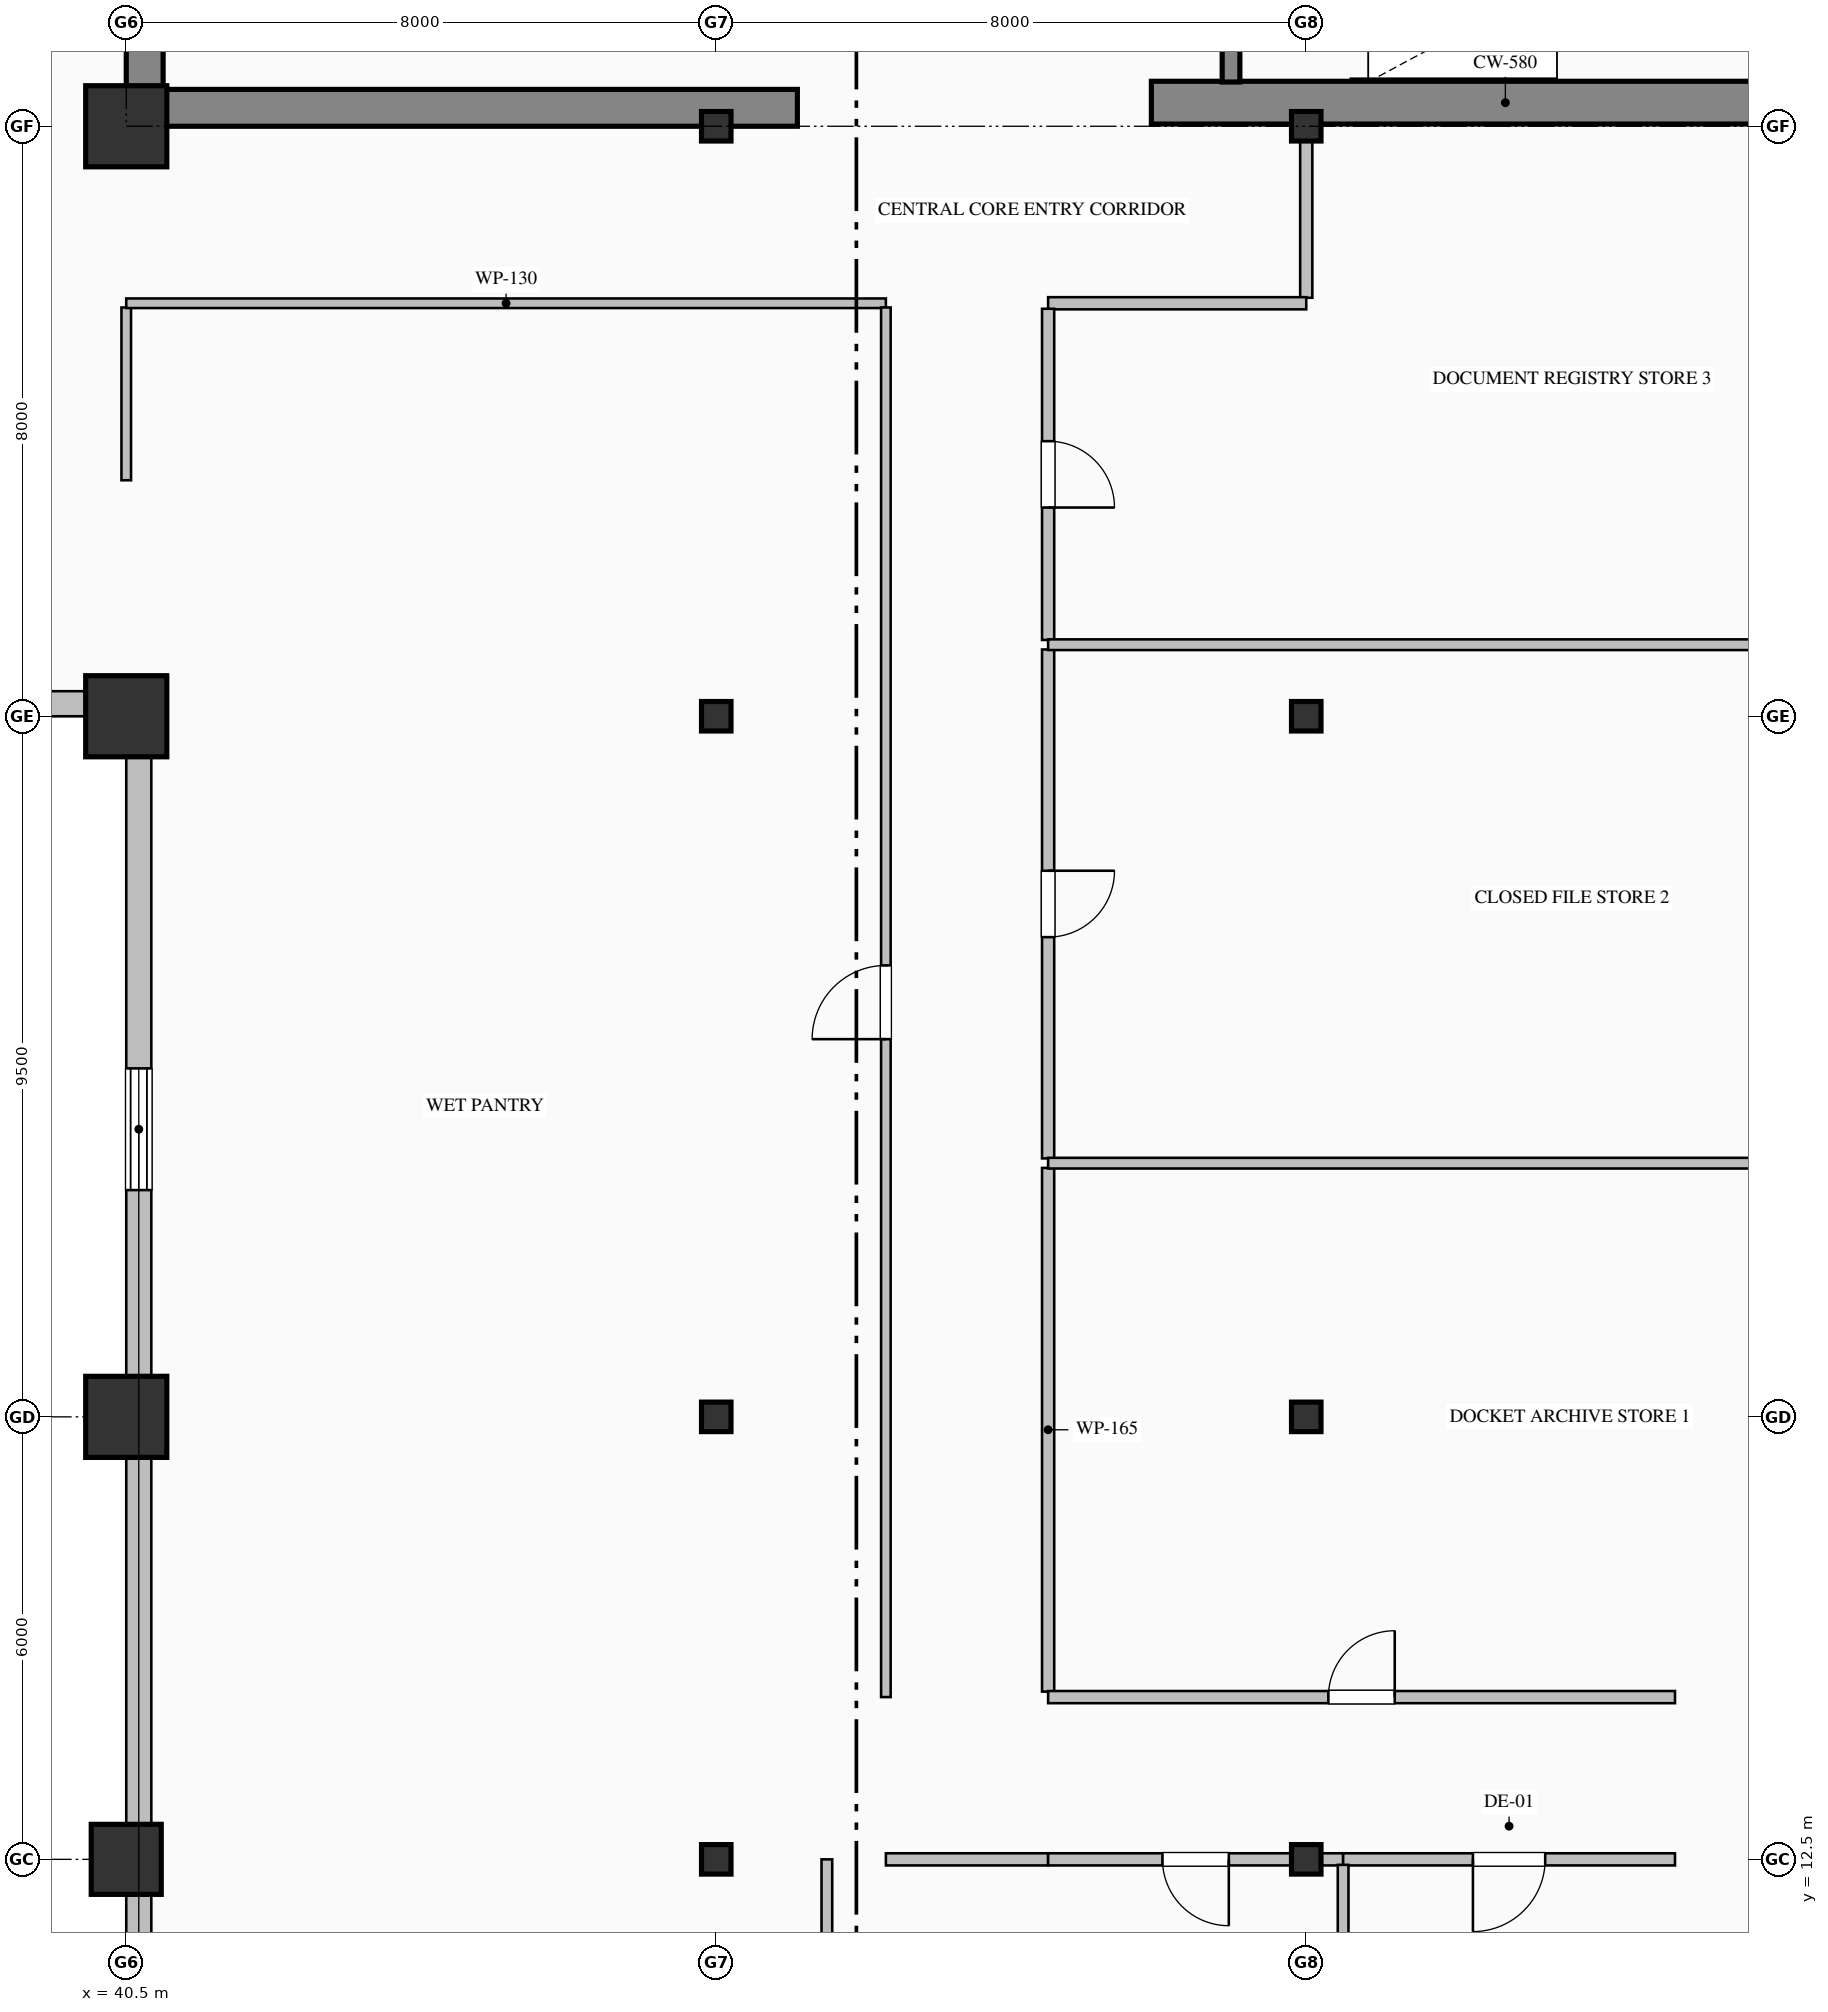
"""IFC4 building model, lengths in metres.
Left out: names, types, materials, properties, quantities, classifications, styles, units other than length and angle.
Written with IfcOpenShell. Run it as: python <this file> out.ifc"""

import sys

from ifc_helpers import new_model, si_unit, direction, frame, frame_2d, origin, origin_2d, place, context, subcontext, project, spatial, rectangle, hollow_rectangle, i_section, extrude, element, fill, save


model = new_model("IFC4")
c1 = context("Model", 3, precision=1e-05, world=origin(), true_north=direction((0.0, 1.0)))
c2 = subcontext(c1, "Body", "Model", "MODEL_VIEW")
j1 = project(units=[si_unit("LENGTHUNIT", "METRE"), si_unit("PLANEANGLEUNIT", "RADIAN")], contexts=[c1])
p1 = place(None, origin())
s1 = spatial("IfcSite", under=j1, at=p1, CompositionType="ELEMENT")
p2 = place(p1, origin())
s2 = spatial("IfcBuilding", under=s1, at=p2, CompositionType="ELEMENT")
p3 = place(p2, frame((0.0, 0.0, 191.0)))
s3 = spatial("IfcBuildingStorey", under=s2, at=p3, CompositionType="ELEMENT", Elevation=191.0)
p4 = place(p3, frame((40.75, 36.5, 0.0), z_axis=(0.0, 0.0, 1.0), x_axis=(0.0, 1.0, 0.0)))
e1 = element("IfcWall", 1, at=p4, inside=s3, PredefinedType="SHEAR", context=c2, shape_type="SweptSolid", body=[
    extrude(rectangle(XDim=7.9, YDim=0.5, at=frame_2d((3.95, 0.0))), origin(), (0.0, 0.0, 1.0), 3.65),
])
p5 = place(p3, frame((40.5, 36.25, 0.0), z_axis=(0.0, 0.0, 1.0), x_axis=(1.0, 0.0, 0.0)))
e2 = element("IfcWall", 2, at=p5, inside=s3, PredefinedType="SHEAR", context=c2, shape_type="SweptSolid", body=[
    extrude(rectangle(XDim=9.1, YDim=0.5, at=frame_2d((4.55, 0.0))), origin(), (0.0, 0.0, 1.0), 3.65),
])
p6 = place(p3, frame((54.4, 36.32, 0.0), z_axis=(0.0, 0.0, 1.0), x_axis=(1.0, 0.0, 0.0)))
e3 = element("IfcWall", 3, at=p6, inside=s3, PredefinedType="SHEAR", context=c2, shape_type="SweptSolid", body=[
    extrude(rectangle(XDim=9.6, YDim=0.58, at=frame_2d((4.8, 0.0))), origin(), (0.0, 0.0, 1.0), 4.0),
])
p7 = place(p3, frame((40.5, 12.5, 0.0), z_axis=(0.0, 0.0, 1.0), x_axis=(1.0, 0.0, 0.0)))
e4 = element("IfcColumn", 4, at=p7, inside=s3, PredefinedType="COLUMN", context=c2, shape_type="SweptSolid", body=[
    extrude(hollow_rectangle(XDim=0.95, YDim=0.95, WallThickness=0.036, at=origin_2d()), origin(), (0.0, 0.0, 1.0), 4.0),
])
for number, where, z_axis, x_axis in (
    (5, (40.5, 18.5, 0.0), (0.0, 0.0, 1.0), (1.0, 0.0, 0.0)),
    (6, (40.5, 28.0, 0.0), (0.0, 0.0, 1.0), (1.0, 0.0, 0.0)),
    (7, (40.5, 36.0, 0.0), (0.0, 0.0, 1.0), (1.0, 0.0, 0.0)),
):
    element("IfcColumn", number, at=place(p3, frame(where, z_axis=z_axis, x_axis=x_axis)), inside=s3, PredefinedType="COLUMN", context=c2, shape_type="SweptSolid", body=[
        extrude(hollow_rectangle(XDim=1.1, YDim=1.1, WallThickness=0.04, at=origin_2d()), origin(), (0.0, 0.0, 1.0), 4.0),
    ])
for number, where, z_axis, x_axis in (
    (8, (48.5, 12.5, 0.0), (0.0, 0.0, 1.0), (1.0, 0.0, 0.0)),
    (9, (48.5, 18.5, 0.0), (0.0, 0.0, 1.0), (1.0, 0.0, 0.0)),
    (10, (48.5, 28.0, 0.0), (0.0, 0.0, 1.0), (1.0, 0.0, 0.0)),
    (11, (48.5, 36.0, 0.0), (0.0, 0.0, 1.0), (1.0, 0.0, 0.0)),
    (12, (56.5, 12.5, 0.0), (0.0, 0.0, 1.0), (1.0, 0.0, 0.0)),
    (13, (56.5, 18.5, 0.0), (0.0, 0.0, 1.0), (1.0, 0.0, 0.0)),
    (14, (56.5, 28.0, 0.0), (0.0, 0.0, 1.0), (1.0, 0.0, 0.0)),
    (15, (56.5, 36.0, 0.0), (0.0, 0.0, 1.0), (1.0, 0.0, 0.0)),
):
    element("IfcColumn", number, at=place(p3, frame(where, z_axis=z_axis, x_axis=x_axis)), inside=s3, PredefinedType="COLUMN", context=c2, shape_type="SweptSolid", body=[
        extrude(i_section(OverallWidth=0.4, OverallDepth=0.4, WebThickness=0.013, FlangeThickness=0.021, FilletRadius=0.022, at=origin_2d()), origin(), (0.0, 0.0, 1.0), 4.0),
    ])
p8 = place(p3, frame((40.67, 8.0, 0.0), z_axis=(0.0, 0.0, 1.0), x_axis=(0.0, 1.0, 0.0)))
e16 = element("IfcWall", 16, at=p8, inside=s3, PredefinedType="SOLIDWALL", context=c2, shape_type="SweptSolid", body=[
    extrude(rectangle(XDim=20.34, YDim=0.34, at=frame_2d((10.17, 0.0))), origin(), (0.0, 0.0, 1.0), 3.05),
])
p9 = place(p8, frame((13.575, 0.0, 0.85)))
e17 = element("IfcOpeningElement", 17, at=p9, cuts=e16, PredefinedType="OPENING", context=c2, shape_type="SweptSolid", body=[
    extrude(rectangle(XDim=1.65, YDim=1.95, at=frame_2d((0.825, 0.975))), frame((0.0, 0.18, 0.0), z_axis=(0.0, -1.0, 0.0), x_axis=(1.0, 0.0, 0.0)), (0.0, 0.0, 1.0), 0.36),
])
p10 = place(p3, frame((40.52, 28.17, 0.0), z_axis=(0.0, 0.0, 1.0), x_axis=(-1.0, 0.0, 0.0)))
e18 = element("IfcWall", 18, at=p10, inside=s3, PredefinedType="SOLIDWALL", context=c2, shape_type="SweptSolid", body=[
    extrude(rectangle(XDim=27.52, YDim=0.34, at=frame_2d((13.76, 0.0))), origin(), (0.0, 0.0, 1.0), 3.05),
])
p11 = place(p10, frame((9.975, 0.0, 0.85)))
e19 = element("IfcOpeningElement", 19, at=p11, cuts=e18, PredefinedType="OPENING", context=c2, shape_type="SweptSolid", body=[
    extrude(rectangle(XDim=1.65, YDim=1.95, at=frame_2d((0.825, 0.975))), frame((0.0, 0.18, 0.0), z_axis=(0.0, -1.0, 0.0), x_axis=(1.0, 0.0, 0.0)), (0.0, 0.0, 1.0), 0.36),
])
p12 = place(p10, frame((17.25, 0.0, 0.85)))
e20 = element("IfcOpeningElement", 20, at=p12, cuts=e18, PredefinedType="OPENING", context=c2, shape_type="SweptSolid", body=[
    extrude(rectangle(XDim=1.5, YDim=1.95, at=frame_2d((0.75, 0.975))), frame((0.0, 0.18, 0.0), z_axis=(0.0, -1.0, 0.0), x_axis=(1.0, 0.0, 0.0)), (0.0, 0.0, 1.0), 0.36),
])
p13 = place(p10, frame((20.775, 0.0, 0.85)))
e21 = element("IfcOpeningElement", 21, at=p13, cuts=e18, PredefinedType="OPENING", context=c2, shape_type="SweptSolid", body=[
    extrude(rectangle(XDim=1.65, YDim=1.95, at=frame_2d((0.825, 0.975))), frame((0.0, 0.18, 0.0), z_axis=(0.0, -1.0, 0.0), x_axis=(1.0, 0.0, 0.0)), (0.0, 0.0, 1.0), 0.36),
])
p14 = place(p3, frame((55.48, 39.75, 0.0), z_axis=(0.0, 0.0, 1.0), x_axis=(0.0, -1.0, 0.0)))
e22 = element("IfcWall", 22, at=p14, inside=s3, PredefinedType="SOLIDWALL", context=c2, shape_type="SweptSolid", body=[
    extrude(rectangle(XDim=3.15, YDim=0.24, at=frame_2d((1.575, 0.0))), origin(), (0.0, 0.0, 1.0), 4.0),
])
p15 = place(p14, frame((1.0, 0.0, 0.0)))
e23 = element("IfcOpeningElement", 23, at=p15, cuts=e22, PredefinedType="OPENING", context=c2, shape_type="SweptSolid", body=[
    extrude(rectangle(XDim=1.15, YDim=2.2, at=frame_2d((0.575, 1.1))), frame((0.0, 0.13, 0.0), z_axis=(0.0, -1.0, 0.0), x_axis=(1.0, 0.0, 0.0)), (0.0, 0.0, 1.0), 0.26),
])
p16 = place(p3, frame((40.5, 33.543, 0.0), z_axis=(0.0, 0.0, 1.0), x_axis=(0.0, -1.0, 0.0)))
e24 = element("IfcWall", 24, at=p16, inside=s3, PredefinedType="PARTITIONING", context=c2, shape_type="SweptSolid", body=[
    extrude(rectangle(XDim=2.343, YDim=0.13, at=frame_2d((1.171, 0.0))), origin(), (0.0, 0.0, 1.0), 3.042),
])
p17 = place(p3, frame((56.5, 36.0, 0.0), z_axis=(0.0, 0.0, 1.0), x_axis=(0.0, -1.0, 0.0)))
e25 = element("IfcWall", 25, at=p17, inside=s3, PredefinedType="PARTITIONING", context=c2, shape_type="SweptSolid", body=[
    extrude(rectangle(XDim=2.325, YDim=0.165, at=frame_2d((1.163, 0.0))), origin(), (0.0, 0.0, 1.0), 3.042),
])
p18 = place(p3, frame((56.5, 33.6, 0.0), z_axis=(0.0, 0.0, 1.0), x_axis=(-1.0, 0.0, 0.0)))
e26 = element("IfcWall", 26, at=p18, inside=s3, PredefinedType="PARTITIONING", context=c2, shape_type="SweptSolid", body=[
    extrude(rectangle(XDim=3.5, YDim=0.165, at=frame_2d((1.75, 0.0))), origin(), (0.0, 0.0, 1.0), 3.65),
])
p19 = place(p3, frame((50.8, 33.6, 0.0), z_axis=(0.0, 0.0, 1.0), x_axis=(-1.0, 0.0, 0.0)))
e27 = element("IfcWall", 27, at=p19, inside=s3, PredefinedType="PARTITIONING", context=c2, shape_type="SweptSolid", body=[
    extrude(rectangle(XDim=10.3, YDim=0.13, at=frame_2d((5.15, 0.0))), origin(), (0.0, 0.0, 1.0), 3.65),
])
p20 = place(p3, frame((53.0, 21.875, 0.0), z_axis=(0.0, 0.0, 1.0), x_axis=(0.0, -1.0, 0.0)))
e28 = element("IfcWall", 28, at=p20, inside=s3, PredefinedType="PARTITIONING", context=c2, shape_type="SweptSolid", body=[
    extrude(rectangle(XDim=7.101, YDim=0.165, at=frame_2d((3.551, 0.0))), origin(), (0.0, 0.0, 1.0), 3.65),
])
p21 = place(p3, frame((53.0, 28.906, 0.0), z_axis=(0.0, 0.0, 1.0), x_axis=(0.0, -1.0, 0.0)))
e29 = element("IfcWall", 29, at=p21, inside=s3, PredefinedType="PARTITIONING", context=c2, shape_type="SweptSolid", body=[
    extrude(rectangle(XDim=6.901, YDim=0.165, at=frame_2d((3.451, 0.0))), origin(), (0.0, 0.0, 1.0), 3.65),
])
p22 = place(p21, frame((3.0, 0.0, 0.0)))
e30 = element("IfcOpeningElement", 30, at=p22, cuts=e29, PredefinedType="OPENING", context=c2, shape_type="SweptSolid", body=[
    extrude(rectangle(XDim=0.9, YDim=2.15, at=frame_2d((0.45, 1.075))), frame((0.0, 0.093, 0.0), z_axis=(0.0, -1.0, 0.0), x_axis=(1.0, 0.0, 0.0)), (0.0, 0.0, 1.0), 0.185),
])
p23 = place(p3, frame((53.0, 33.525, 0.0), z_axis=(0.0, 0.0, 1.0), x_axis=(0.0, -1.0, 0.0)))
e31 = element("IfcWall", 31, at=p23, inside=s3, PredefinedType="PARTITIONING", context=c2, shape_type="SweptSolid", body=[
    extrude(rectangle(XDim=4.491, YDim=0.165, at=frame_2d((2.246, 0.0))), origin(), (0.0, 0.0, 1.0), 3.65),
])
p24 = place(p23, frame((1.795, 0.0, 0.0)))
e32 = element("IfcOpeningElement", 32, at=p24, cuts=e31, PredefinedType="OPENING", context=c2, shape_type="SweptSolid", body=[
    extrude(rectangle(XDim=0.9, YDim=2.15, at=frame_2d((0.45, 1.075))), frame((0.0, 0.093, 0.0), z_axis=(0.0, -1.0, 0.0), x_axis=(1.0, 0.0, 0.0)), (0.0, 0.0, 1.0), 0.185),
])
p25 = place(p3, frame((50.8, 14.7, 0.0), z_axis=(0.0, 0.0, 1.0), x_axis=(0.0, 1.0, 0.0)))
e33 = element("IfcWall", 33, at=p25, inside=s3, PredefinedType="PARTITIONING", context=c2, shape_type="SweptSolid", body=[
    extrude(rectangle(XDim=18.843, YDim=0.13, at=frame_2d((9.421, 0.0))), origin(), (0.0, 0.0, 1.0), 3.65),
])
p26 = place(p25, frame((8.921, 0.0, 0.0)))
e34 = element("IfcOpeningElement", 34, at=p26, cuts=e33, PredefinedType="OPENING", context=c2, shape_type="SweptSolid", body=[
    extrude(rectangle(XDim=1.0, YDim=2.15, at=frame_2d((0.5, 1.075))), frame((0.0, 0.075, 0.0), z_axis=(0.0, -1.0, 0.0), x_axis=(1.0, 0.0, 0.0)), (0.0, 0.0, 1.0), 0.15),
])
p27 = place(p3, frame((53.0, 12.5, 0.0), z_axis=(0.0, 0.0, 1.0), x_axis=(-1.0, 0.0, 0.0)))
e35 = element("IfcWall", 35, at=p27, inside=s3, PredefinedType="PARTITIONING", context=c2, shape_type="SweptSolid", body=[
    extrude(rectangle(XDim=2.2, YDim=0.165, at=frame_2d((1.1, 0.0))), origin(), (0.0, 0.0, 1.0), 3.042),
])
p28 = place(p3, frame((53.0, 14.7, 0.0), z_axis=(0.0, 0.0, 1.0), x_axis=(1.0, 0.0, 0.0)))
e36 = element("IfcWall", 36, at=p28, inside=s3, PredefinedType="PARTITIONING", context=c2, shape_type="SweptSolid", body=[
    extrude(rectangle(XDim=8.5, YDim=0.165, at=frame_2d((4.25, 0.0))), origin(), (0.0, 0.0, 1.0), 3.65),
])
p29 = place(p28, frame((3.8, 0.0, 0.0)))
e37 = element("IfcOpeningElement", 37, at=p29, cuts=e36, PredefinedType="OPENING", context=c2, shape_type="SweptSolid", body=[
    extrude(rectangle(XDim=0.9, YDim=2.15, at=frame_2d((0.45, 1.075))), frame((0.0, 0.093, 0.0), z_axis=(0.0, -1.0, 0.0), x_axis=(1.0, 0.0, 0.0)), (0.0, 0.0, 1.0), 0.185),
])
p30 = place(p3, frame((57.0, 12.5, 0.0), z_axis=(0.0, 0.0, 1.0), x_axis=(-1.0, 0.0, 0.0)))
e38 = element("IfcWall", 38, at=p30, inside=s3, PredefinedType="PARTITIONING", context=c2, shape_type="SweptSolid", body=[
    extrude(rectangle(XDim=4.0, YDim=0.165, at=frame_2d((2.0, 0.0))), origin(), (0.0, 0.0, 1.0), 3.042),
])
p31 = place(p30, frame((1.55, 0.0, 0.0)))
e39 = element("IfcOpeningElement", 39, at=p31, cuts=e38, PredefinedType="OPENING", context=c2, shape_type="SweptSolid", body=[
    extrude(rectangle(XDim=0.9, YDim=2.15, at=frame_2d((0.45, 1.075))), frame((0.0, 0.093, 0.0), z_axis=(0.0, -1.0, 0.0), x_axis=(1.0, 0.0, 0.0)), (0.0, 0.0, 1.0), 0.185),
])
p32 = place(p3, frame((61.5, 12.5, 0.0), z_axis=(0.0, 0.0, 1.0), x_axis=(-1.0, 0.0, 0.0)))
e40 = element("IfcWall", 40, at=p32, inside=s3, PredefinedType="PARTITIONING", context=c2, shape_type="SweptSolid", body=[
    extrude(rectangle(XDim=4.5, YDim=0.165, at=frame_2d((2.25, 0.0))), origin(), (0.0, 0.0, 1.0), 3.042),
])
p33 = place(p32, frame((1.76, 0.0, 0.0)))
e41 = element("IfcOpeningElement", 41, at=p33, cuts=e40, PredefinedType="OPENING", context=c2, shape_type="SweptSolid", body=[
    extrude(rectangle(XDim=0.98, YDim=2.25, at=frame_2d((0.49, 1.125))), frame((0.0, 0.093, 0.0), z_axis=(0.0, -1.0, 0.0), x_axis=(1.0, 0.0, 0.0)), (0.0, 0.0, 1.0), 0.185),
])
for number, where, z_axis, x_axis in (
    (42, (53.0, 21.94, 0.0), (0.0, 0.0, 1.0), (1.0, 0.0, 0.0)),
    (43, (53.0, 28.97, 0.0), (0.0, 0.0, 1.0), (1.0, 0.0, 0.0)),
):
    element("IfcWall", number, at=place(p3, frame(where, z_axis=z_axis, x_axis=x_axis)), inside=s3, PredefinedType="PARTITIONING", context=c2, shape_type="SweptSolid", body=[
        extrude(rectangle(XDim=10.668, YDim=0.145, at=frame_2d((5.334, 0.0))), origin(), (0.0, 0.0, 1.0), 3.65),
    ])
p34 = place(p3, frame((50.0, 12.5, 0.0), z_axis=(0.0, 0.0, 1.0), x_axis=(0.0, -1.0, 0.0)))
e44 = element("IfcWall", 44, at=p34, inside=s3, PredefinedType="PARTITIONING", context=c2, shape_type="SweptSolid", body=[
    extrude(rectangle(XDim=8.168, YDim=0.145, at=frame_2d((4.084, 0.0))), origin(), (0.0, 0.0, 1.0), 3.65),
])
p35 = place(p34, frame((3.534, 0.0, 0.0)))
e45 = element("IfcOpeningElement", 45, at=p35, cuts=e44, PredefinedType="OPENING", context=c2, shape_type="SweptSolid", body=[
    extrude(rectangle(XDim=1.1, YDim=2.2, at=frame_2d((0.55, 1.1))), frame((0.0, 0.083, 0.0), z_axis=(0.0, -1.0, 0.0), x_axis=(1.0, 0.0, 0.0)), (0.0, 0.0, 1.0), 0.165),
])
p36 = place(p3, frame((57.0, 12.426, 0.0), z_axis=(0.0, 0.0, 1.0), x_axis=(0.0, -1.0, 0.0)))
e46 = element("IfcWall", 46, at=p36, inside=s3, PredefinedType="PARTITIONING", context=c2, shape_type="SweptSolid", body=[
    extrude(rectangle(XDim=8.094, YDim=0.145, at=frame_2d((4.047, 0.0))), origin(), (0.0, 0.0, 1.0), 3.65),
])
p37 = place(p9, origin())
e47 = element("IfcWindow", 47, at=p37, inside=s3, PartitioningType="DOUBLE_PANEL_VERTICAL", PredefinedType="WINDOW", context=c2, shape_type="SweptSolid", body=[
    extrude(rectangle(XDim=1.65, YDim=1.95, at=frame_2d((0.825, 0.975))), frame((0.0, 0.15, 0.0), z_axis=(0.0, -1.0, 0.0), x_axis=(1.0, 0.0, 0.0)), (0.0, 0.0, 1.0), 0.06),
])
fill(e17, e47)
p38 = place(p29, origin())
e48 = element("IfcDoor", 48, at=p38, inside=s3, OperationType="SINGLE_SWING_RIGHT", PredefinedType="DOOR", context=c2, shape_type="SweptSolid", body=[
    extrude(rectangle(XDim=0.9, YDim=2.15, at=frame_2d((0.45, 1.075))), frame((0.0, 0.025, 0.0), z_axis=(0.0, -1.0, 0.0), x_axis=(1.0, 0.0, 0.0)), (0.0, 0.0, 1.0), 0.05),
])
fill(e37, e48)
p39 = place(p22, origin())
e49 = element("IfcDoor", 49, at=p39, inside=s3, OperationType="SINGLE_SWING_LEFT", PredefinedType="DOOR", context=c2, shape_type="SweptSolid", body=[
    extrude(rectangle(XDim=0.9, YDim=2.15, at=frame_2d((0.45, 1.075))), frame((0.0, 0.025, 0.0), z_axis=(0.0, -1.0, 0.0), x_axis=(1.0, 0.0, 0.0)), (0.0, 0.0, 1.0), 0.05),
])
fill(e30, e49)
p40 = place(p24, origin())
e50 = element("IfcDoor", 50, at=p40, inside=s3, OperationType="SINGLE_SWING_RIGHT", PredefinedType="DOOR", context=c2, shape_type="SweptSolid", body=[
    extrude(rectangle(XDim=0.9, YDim=2.15, at=frame_2d((0.45, 1.075))), frame((0.0, 0.025, 0.0), z_axis=(0.0, -1.0, 0.0), x_axis=(1.0, 0.0, 0.0)), (0.0, 0.0, 1.0), 0.05),
])
fill(e32, e50)
p41 = place(p26, origin())
e51 = element("IfcDoor", 51, at=p41, inside=s3, OperationType="SINGLE_SWING_LEFT", PredefinedType="DOOR", context=c2, shape_type="SweptSolid", body=[
    extrude(rectangle(XDim=1.0, YDim=2.15, at=frame_2d((0.5, 1.075))), frame((0.0, 0.025, 0.0), z_axis=(0.0, -1.0, 0.0), x_axis=(1.0, 0.0, 0.0)), (0.0, 0.0, 1.0), 0.05),
])
fill(e34, e51)
p42 = place(p31, origin())
e52 = element("IfcDoor", 52, at=p42, inside=s3, OperationType="SINGLE_SWING_LEFT", PredefinedType="DOOR", context=c2, shape_type="SweptSolid", body=[
    extrude(rectangle(XDim=0.9, YDim=2.15, at=frame_2d((0.45, 1.075))), frame((0.0, 0.025, 0.0), z_axis=(0.0, -1.0, 0.0), x_axis=(1.0, 0.0, 0.0)), (0.0, 0.0, 1.0), 0.05),
])
fill(e39, e52)
p43 = place(p33, origin())
e53 = element("IfcDoor", 53, at=p43, inside=s3, OperationType="SINGLE_SWING_RIGHT", PredefinedType="DOOR", context=c2, shape_type="SweptSolid", body=[
    extrude(rectangle(XDim=0.98, YDim=2.25, at=frame_2d((0.49, 1.125))), frame((0.0, 0.025, 0.0), z_axis=(0.0, -1.0, 0.0), x_axis=(1.0, 0.0, 0.0)), (0.0, 0.0, 1.0), 0.05),
])
fill(e41, e53)
save(model, sys.argv[1])
